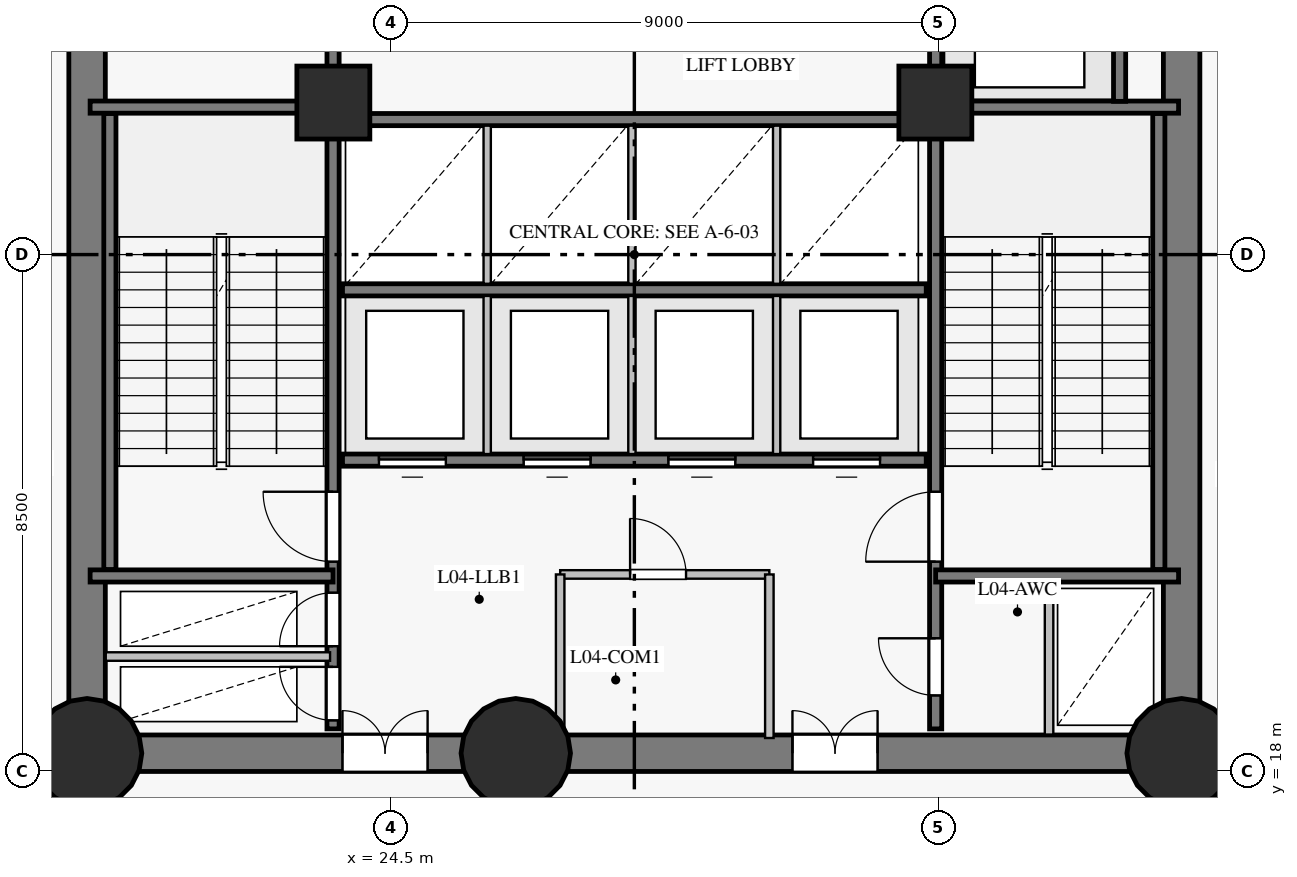
"""IFC4 building model, lengths in metres.
Left out: names, types, materials, properties, quantities, classifications, styles, units other than length and angle.
Written with IfcOpenShell. Run it as: python <this file> out.ifc"""

import sys

from ifc_helpers import new_model, si_unit, direction, frame, frame_2d, origin, origin_with_axes, origin_2d, place, context, subcontext, project, spatial, rectangle, circle, extrude, source, transform, mapped, element, fill, save


model = new_model("IFC4")
c1 = context("Model", 3, precision=1e-05, world=origin(), true_north=direction((0.0, 1.0)))
c2 = subcontext(c1, "Body", "Model", "MODEL_VIEW")
j1 = project(units=[si_unit("LENGTHUNIT", "METRE"), si_unit("PLANEANGLEUNIT", "RADIAN")], contexts=[c1])
p1 = place(None, origin())
s1 = spatial("IfcSite", under=j1, at=p1, CompositionType="ELEMENT")
p2 = place(p1, origin())
s2 = spatial("IfcBuilding", under=s1, at=p2, CompositionType="ELEMENT")
p3 = place(p2, frame((0.0, 0.0, 18.0)))
s3 = spatial("IfcBuildingStorey", under=s2, at=p3, CompositionType="ELEMENT", Elevation=18.0)
p4 = place(p3, frame((19.5, 18.3, 0.0), z_axis=(0.0, 0.0, 1.0), x_axis=(1.0, 0.0, 0.0)))
e1 = element("IfcWall", 1, at=p4, inside=s3, PredefinedType="SHEAR", context=c2, shape_type="SweptSolid", body=[
    extrude(rectangle(XDim=7.05, YDim=0.6, at=frame_2d((3.525, 0.0))), origin(), (0.0, 0.0, 1.0), 4.225),
])
p5 = place(p4, frame((4.2, 0.0, 0.0)))
e2 = element("IfcOpeningElement", 2, at=p5, cuts=e1, PredefinedType="OPENING", context=c2, shape_type="SweptSolid", body=[
    extrude(rectangle(XDim=1.4, YDim=2.2, at=frame_2d((0.7, 1.1))), frame((0.0, 0.31, 0.0), z_axis=(0.0, -1.0, 0.0), x_axis=(1.0, 0.0, 0.0)), (0.0, 0.0, 1.0), 0.62),
])
p6 = place(p3, frame((26.55, 18.3, 0.0), z_axis=(0.0, 0.0, 1.0), x_axis=(1.0, 0.0, 0.0)))
e3 = element("IfcWall", 3, at=p6, inside=s3, PredefinedType="SHEAR", context=c2, shape_type="SweptSolid", body=[
    extrude(rectangle(XDim=10.95, YDim=0.6, at=frame_2d((5.475, 0.0))), origin(), (0.0, 0.0, 1.0), 4.225),
])
p7 = place(p6, frame((4.55, 0.0, 0.0)))
e4 = element("IfcOpeningElement", 4, at=p7, cuts=e3, PredefinedType="OPENING", context=c2, shape_type="SweptSolid", body=[
    extrude(rectangle(XDim=1.4, YDim=2.2, at=frame_2d((0.7, 1.1))), frame((0.0, 0.31, 0.0), z_axis=(0.0, -1.0, 0.0), x_axis=(1.0, 0.0, 0.0)), (0.0, 0.0, 1.0), 0.62),
])
p8 = place(p3, frame((37.5, 18.3, 0.0), z_axis=(0.0, 0.0, 1.0), x_axis=(0.0, 1.0, 0.0)))
e5 = element("IfcWall", 5, at=p8, inside=s3, PredefinedType="SHEAR", context=c2, shape_type="SweptSolid", body=[
    extrude(rectangle(XDim=16.4, YDim=0.6, at=frame_2d((8.2, 0.0))), origin(), (0.0, 0.0, 1.0), 4.225),
])
p9 = place(p8, frame((13.96, 0.0, 0.0)))
e6 = element("IfcOpeningElement", 6, at=p9, cuts=e5, PredefinedType="OPENING", context=c2, shape_type="SweptSolid", body=[
    extrude(rectangle(XDim=1.2, YDim=2.15, at=frame_2d((0.6, 1.075))), frame((0.0, 0.31, 0.0), z_axis=(0.0, -1.0, 0.0), x_axis=(1.0, 0.0, 0.0)), (0.0, 0.0, 1.0), 0.62),
])
p10 = place(p3, frame((19.5, 34.7, 0.0), z_axis=(0.0, 0.0, 1.0), x_axis=(0.0, -1.0, 0.0)))
e7 = element("IfcWall", 7, at=p10, inside=s3, PredefinedType="SHEAR", context=c2, shape_type="SweptSolid", body=[
    extrude(rectangle(XDim=16.4, YDim=0.6, at=frame_2d((8.2, 0.0))), origin(), (0.0, 0.0, 1.0), 4.225),
])
p11 = place(p10, frame((3.1, 0.0, 0.0)))
e8 = element("IfcOpeningElement", 8, at=p11, cuts=e7, PredefinedType="OPENING", context=c2, shape_type="SweptSolid", body=[
    extrude(rectangle(XDim=1.1, YDim=2.15, at=frame_2d((0.55, 1.075))), frame((0.0, 0.31, 0.0), z_axis=(0.0, -1.0, 0.0), x_axis=(1.0, 0.0, 0.0)), (0.0, 0.0, 1.0), 0.62),
])
m1 = source(origin_with_axes(), c2, "Body", "SweptSolid", [
    extrude(circle(Radius=0.9, at=origin_2d()), origin(), (0.0, 0.0, 1.0), 4.5),
])
for number, where, z_axis, x_axis in (
    (9, (19.5, 18.3, 0.0), (0.0, 0.0, 1.0), (1.0, 0.0, 0.0)),
    (10, (26.55, 18.3, 0.0), (0.0, 0.0, 1.0), (1.0, 0.0, 0.0)),
    (11, (37.5, 18.3, 0.0), (0.0, 0.0, 1.0), (1.0, 0.0, 0.0)),
):
    element("IfcColumn", number, at=place(p3, frame(where, z_axis=z_axis, x_axis=x_axis)), inside=s3, PredefinedType="COLUMN", context=c2, shape_type="MappedRepresentation", body=[
        mapped(m1, transform((0.0, 0.0, 0.0), scale=1.0)),
    ])
m2 = source(origin_with_axes(), c2, "Body", "SweptSolid", [
    extrude(rectangle(XDim=1.2, YDim=1.2, at=origin_2d()), origin(), (0.0, 0.0, 1.0), 4.5),
])
for number, where, z_axis, x_axis in (
    (12, (23.55, 29.0, 0.0), (0.0, 0.0, 1.0), (1.0, 0.0, 0.0)),
    (13, (33.45, 29.0, 0.0), (0.0, 0.0, 1.0), (1.0, 0.0, 0.0)),
):
    element("IfcColumn", number, at=place(p3, frame(where, z_axis=z_axis, x_axis=x_axis)), inside=s3, PredefinedType="COLUMN", context=c2, shape_type="MappedRepresentation", body=[
        mapped(m2, transform((0.0, 0.0, 0.0), scale=1.0)),
    ])
p12 = place(p3, frame((23.545, 18.7, 0.0), z_axis=(0.0, 0.0, 1.0), x_axis=(0.0, 1.0, 0.0)))
e14 = element("IfcWall", 14, at=p12, inside=s3, PredefinedType="SHEAR", context=c2, shape_type="SweptSolid", body=[
    extrude(rectangle(XDim=15.6, YDim=0.2, at=frame_2d((7.8, 0.0))), origin(), (0.0, 0.0, 1.0), 4.225),
])
p13 = place(p12, frame((2.75, 0.0, 0.0)))
e15 = element("IfcOpeningElement", 15, at=p13, cuts=e14, PredefinedType="OPENING", context=c2, shape_type="SweptSolid", body=[
    extrude(rectangle(XDim=1.15, YDim=2.15, at=frame_2d((0.575, 1.075))), frame((0.0, 0.11, 0.0), z_axis=(0.0, -1.0, 0.0), x_axis=(1.0, 0.0, 0.0)), (0.0, 0.0, 1.0), 0.22),
])
p14 = place(p12, frame((0.14, 0.0, 0.0)))
e16 = element("IfcOpeningElement", 16, at=p14, cuts=e14, PredefinedType="OPENING", context=c2, shape_type="SweptSolid", body=[
    extrude(rectangle(XDim=0.88, YDim=2.1, at=frame_2d((0.44, 1.05))), frame((0.0, 0.11, 0.0), z_axis=(0.0, -1.0, 0.0), x_axis=(1.0, 0.0, 0.0)), (0.0, 0.0, 1.0), 0.22),
])
p15 = place(p12, frame((1.36, 0.0, 0.0)))
e17 = element("IfcOpeningElement", 17, at=p15, cuts=e14, PredefinedType="OPENING", context=c2, shape_type="SweptSolid", body=[
    extrude(rectangle(XDim=0.88, YDim=2.1, at=frame_2d((0.44, 1.05))), frame((0.0, 0.11, 0.0), z_axis=(0.0, -1.0, 0.0), x_axis=(1.0, 0.0, 0.0)), (0.0, 0.0, 1.0), 0.22),
])
p16 = place(p12, frame((12.1, 0.0, 0.0)))
e18 = element("IfcOpeningElement", 18, at=p16, cuts=e14, PredefinedType="OPENING", context=c2, shape_type="SweptSolid", body=[
    extrude(rectangle(XDim=1.12, YDim=2.15, at=frame_2d((0.56, 1.075))), frame((0.0, 0.11, 0.0), z_axis=(0.0, -1.0, 0.0), x_axis=(1.0, 0.0, 0.0)), (0.0, 0.0, 1.0), 0.22),
])
p17 = place(p12, frame((14.05, 0.0, 0.0)))
e19 = element("IfcOpeningElement", 19, at=p17, cuts=e14, PredefinedType="OPENING", context=c2, shape_type="SweptSolid", body=[
    extrude(rectangle(XDim=1.12, YDim=2.15, at=frame_2d((0.56, 1.075))), frame((0.0, 0.11, 0.0), z_axis=(0.0, -1.0, 0.0), x_axis=(1.0, 0.0, 0.0)), (0.0, 0.0, 1.0), 0.22),
])
p18 = place(p3, frame((33.455, 18.7, 0.0), z_axis=(0.0, 0.0, 1.0), x_axis=(0.0, 1.0, 0.0)))
e20 = element("IfcWall", 20, at=p18, inside=s3, PredefinedType="SHEAR", context=c2, shape_type="SweptSolid", body=[
    extrude(rectangle(XDim=15.6, YDim=0.2, at=frame_2d((7.8, 0.0))), origin(), (0.0, 0.0, 1.0), 4.225),
])
p19 = place(p18, frame((2.75, 0.0, 0.0)))
e21 = element("IfcOpeningElement", 21, at=p19, cuts=e20, PredefinedType="OPENING", context=c2, shape_type="SweptSolid", body=[
    extrude(rectangle(XDim=1.15, YDim=2.15, at=frame_2d((0.575, 1.075))), frame((0.0, 0.11, 0.0), z_axis=(0.0, -1.0, 0.0), x_axis=(1.0, 0.0, 0.0)), (0.0, 0.0, 1.0), 0.22),
])
p20 = place(p18, frame((0.55, 0.0, 0.0)))
e22 = element("IfcOpeningElement", 22, at=p20, cuts=e20, PredefinedType="OPENING", context=c2, shape_type="SweptSolid", body=[
    extrude(rectangle(XDim=0.94, YDim=2.1, at=frame_2d((0.47, 1.05))), frame((0.0, 0.11, 0.0), z_axis=(0.0, -1.0, 0.0), x_axis=(1.0, 0.0, 0.0)), (0.0, 0.0, 1.0), 0.22),
])
p21 = place(p3, frame((23.7, 23.12, 0.0), z_axis=(0.0, 0.0, 1.0), x_axis=(1.0, 0.0, 0.0)))
e23 = element("IfcWall", 23, at=p21, inside=s3, PredefinedType="SHEAR", context=c2, shape_type="SweptSolid", body=[
    extrude(rectangle(XDim=9.6, YDim=0.2, at=frame_2d((4.8, 0.0))), origin(), (0.0, 0.0, 1.0), 4.225),
])
p22 = place(p21, frame((0.6, 0.0, 0.0)))
e24 = element("IfcOpeningElement", 24, at=p22, cuts=e23, PredefinedType="OPENING", context=c2, shape_type="SweptSolid", body=[
    extrude(rectangle(XDim=1.1, YDim=2.15, at=frame_2d((0.55, 1.075))), frame((0.0, 0.11, 0.0), z_axis=(0.0, -1.0, 0.0), x_axis=(1.0, 0.0, 0.0)), (0.0, 0.0, 1.0), 0.22),
])
p23 = place(p21, frame((2.98, 0.0, 0.0)))
e25 = element("IfcOpeningElement", 25, at=p23, cuts=e23, PredefinedType="OPENING", context=c2, shape_type="SweptSolid", body=[
    extrude(rectangle(XDim=1.1, YDim=2.15, at=frame_2d((0.55, 1.075))), frame((0.0, 0.11, 0.0), z_axis=(0.0, -1.0, 0.0), x_axis=(1.0, 0.0, 0.0)), (0.0, 0.0, 1.0), 0.22),
])
p24 = place(p21, frame((5.36, 0.0, 0.0)))
e26 = element("IfcOpeningElement", 26, at=p24, cuts=e23, PredefinedType="OPENING", context=c2, shape_type="SweptSolid", body=[
    extrude(rectangle(XDim=1.1, YDim=2.15, at=frame_2d((0.55, 1.075))), frame((0.0, 0.11, 0.0), z_axis=(0.0, -1.0, 0.0), x_axis=(1.0, 0.0, 0.0)), (0.0, 0.0, 1.0), 0.22),
])
p25 = place(p21, frame((7.74, 0.0, 0.0)))
e27 = element("IfcOpeningElement", 27, at=p25, cuts=e23, PredefinedType="OPENING", context=c2, shape_type="SweptSolid", body=[
    extrude(rectangle(XDim=1.1, YDim=2.15, at=frame_2d((0.55, 1.075))), frame((0.0, 0.11, 0.0), z_axis=(0.0, -1.0, 0.0), x_axis=(1.0, 0.0, 0.0)), (0.0, 0.0, 1.0), 0.22),
])
for number, where, z_axis, x_axis in (
    (28, (23.7, 25.92, 0.0), (0.0, 0.0, 1.0), (1.0, 0.0, 0.0)),
    (29, (23.7, 28.72, 0.0), (0.0, 0.0, 1.0), (1.0, 0.0, 0.0)),
):
    element("IfcWall", number, at=place(p3, frame(where, z_axis=z_axis, x_axis=x_axis)), inside=s3, PredefinedType="SHEAR", context=c2, shape_type="SweptSolid", body=[
        extrude(rectangle(XDim=9.6, YDim=0.2, at=frame_2d((4.8, 0.0))), origin(), (0.0, 0.0, 1.0), 4.225),
    ])
for number, where, z_axis, x_axis in (
    (30, (19.875, 21.32, 0.0), (0.0, 0.0, 1.0), (0.0, 1.0, 0.0)),
    (31, (37.125, 21.32, 0.0), (0.0, 0.0, 1.0), (0.0, 1.0, 0.0)),
):
    element("IfcWall", number, at=place(p3, frame(where, z_axis=z_axis, x_axis=x_axis)), inside=s3, PredefinedType="SHEAR", context=c2, shape_type="SweptSolid", body=[
        extrude(rectangle(XDim=7.5, YDim=0.2, at=frame_2d((3.75, 0.0))), origin(), (0.0, 0.0, 1.0), 4.225),
    ])
for number, where, z_axis, x_axis in (
    (32, (33.455, 21.215, 0.0), (0.0, 0.0, 1.0), (1.0, 0.0, 0.0)),
    (33, (33.455, 28.925, 0.0), (0.0, 0.0, 1.0), (1.0, 0.0, 0.0)),
    (34, (19.55, 21.215, 0.0), (0.0, 0.0, 1.0), (1.0, 0.0, 0.0)),
    (35, (19.55, 28.925, 0.0), (0.0, 0.0, 1.0), (1.0, 0.0, 0.0)),
):
    element("IfcWall", number, at=place(p3, frame(where, z_axis=z_axis, x_axis=x_axis)), inside=s3, PredefinedType="SHEAR", context=c2, shape_type="SweptSolid", body=[
        extrude(rectangle(XDim=3.995, YDim=0.2, at=frame_2d((1.998, 0.0))), origin(), (0.0, 0.0, 1.0), 4.225),
    ])
p26 = place(p3, frame((36.48, 29.02, 0.0), z_axis=(0.0, 0.0, 1.0), x_axis=(0.0, 1.0, 0.0)))
e36 = element("IfcWall", 36, at=p26, inside=s3, PredefinedType="SHEAR", context=c2, shape_type="SweptSolid", body=[
    extrude(rectangle(XDim=2.86, YDim=0.2, at=frame_2d((1.43, 0.0))), origin(), (0.0, 0.0, 1.0), 4.225),
])
p27 = place(p3, frame((19.807, 19.89, 0.0), z_axis=(0.0, 0.0, 1.0), x_axis=(1.0, 0.0, 0.0)))
e37 = element("IfcWall", 37, at=p27, inside=s3, PredefinedType="PARTITIONING", context=c2, shape_type="SweptSolid", body=[
    extrude(rectangle(XDim=3.689, YDim=0.14, at=frame_2d((1.844, 0.0))), origin(), (0.0, 0.0, 1.0), 4.225),
])
p28 = place(p3, frame((27.28, 21.24, 0.0), z_axis=(0.0, 0.0, 1.0), x_axis=(1.0, 0.0, 0.0)))
e38 = element("IfcWall", 38, at=p28, inside=s3, PredefinedType="PARTITIONING", context=c2, shape_type="SweptSolid", body=[
    extrude(rectangle(XDim=3.44, YDim=0.14, at=frame_2d((1.72, 0.0))), origin(), (0.0, 0.0, 1.0), 4.225),
])
p29 = place(p28, frame((1.15, 0.0, 0.0)))
e39 = element("IfcOpeningElement", 39, at=p29, cuts=e38, PredefinedType="OPENING", context=c2, shape_type="SweptSolid", body=[
    extrude(rectangle(XDim=0.92, YDim=2.1, at=frame_2d((0.46, 1.05))), frame((0.0, 0.08, 0.0), z_axis=(0.0, -1.0, 0.0), x_axis=(1.0, 0.0, 0.0)), (0.0, 0.0, 1.0), 0.16),
])
for number, where, z_axis, x_axis in (
    (40, (27.28, 18.55, 0.0), (0.0, 0.0, 1.0), (0.0, 1.0, 0.0)),
    (41, (30.72, 18.55, 0.0), (0.0, 0.0, 1.0), (0.0, 1.0, 0.0)),
):
    element("IfcWall", number, at=place(p3, frame(where, z_axis=z_axis, x_axis=x_axis)), inside=s3, PredefinedType="PARTITIONING", context=c2, shape_type="SweptSolid", body=[
        extrude(rectangle(XDim=2.69, YDim=0.14, at=frame_2d((1.345, 0.0))), origin(), (0.0, 0.0, 1.0), 4.225),
    ])
for number, where, z_axis, x_axis in (
    (42, (26.08, 23.22, 0.0), (0.0, 0.0, 1.0), (0.0, 1.0, 0.0)),
    (43, (28.46, 23.22, 0.0), (0.0, 0.0, 1.0), (0.0, 1.0, 0.0)),
    (44, (30.84, 23.22, 0.0), (0.0, 0.0, 1.0), (0.0, 1.0, 0.0)),
    (45, (26.08, 26.02, 0.0), (0.0, 0.0, 1.0), (0.0, 1.0, 0.0)),
    (46, (28.46, 26.02, 0.0), (0.0, 0.0, 1.0), (0.0, 1.0, 0.0)),
    (47, (30.84, 26.02, 0.0), (0.0, 0.0, 1.0), (0.0, 1.0, 0.0)),
):
    element("IfcWall", number, at=place(p3, frame(where, z_axis=z_axis, x_axis=x_axis)), inside=s3, PredefinedType="PARTITIONING", context=c2, shape_type="SweptSolid", body=[
        extrude(rectangle(XDim=2.6, YDim=0.12, at=frame_2d((1.3, 0.0))), origin(), (0.0, 0.0, 1.0), 4.225),
    ])
p30 = place(p3, frame((35.32, 18.607, 0.0), z_axis=(0.0, 0.0, 1.0), x_axis=(0.0, 1.0, 0.0)))
e48 = element("IfcWall", 48, at=p30, inside=s3, PredefinedType="PARTITIONING", context=c2, shape_type="SweptSolid", body=[
    extrude(rectangle(XDim=2.503, YDim=0.14, at=frame_2d((1.251, 0.0))), origin(), (0.0, 0.0, 1.0), 4.225),
])
m3 = source(origin_with_axes(), c2, "Body", "SweptSolid", [
    extrude(rectangle(XDim=1.15, YDim=2.15, at=frame_2d((0.575, 1.075))), frame((0.0, 0.025, 0.0), z_axis=(0.0, -1.0, 0.0), x_axis=(1.0, 0.0, 0.0)), (0.0, 0.0, 1.0), 0.05),
])
p31 = place(p13, origin())
e49 = element("IfcDoor", 49, at=p31, inside=s3, OperationType="SINGLE_SWING_RIGHT", PredefinedType="DOOR", context=c2, shape_type="MappedRepresentation", body=[
    mapped(m3, transform((0.0, 0.0, 0.0), scale=1.0)),
])
fill(e15, e49)
p32 = place(p19, origin())
e50 = element("IfcDoor", 50, at=p32, inside=s3, OperationType="SINGLE_SWING_LEFT", PredefinedType="DOOR", context=c2, shape_type="MappedRepresentation", body=[
    mapped(m3, transform((0.0, 0.0, 0.0), scale=1.0)),
])
fill(e21, e50)
m4 = source(origin_with_axes(), c2, "Body", "SweptSolid", [
    extrude(rectangle(XDim=0.88, YDim=2.1, at=frame_2d((0.44, 1.05))), frame((0.0, 0.025, 0.0), z_axis=(0.0, -1.0, 0.0), x_axis=(1.0, 0.0, 0.0)), (0.0, 0.0, 1.0), 0.05),
])
p33 = place(p14, origin())
e51 = element("IfcDoor", 51, at=p33, inside=s3, OperationType="SINGLE_SWING_RIGHT", PredefinedType="DOOR", context=c2, shape_type="MappedRepresentation", body=[
    mapped(m4, transform((0.0, 0.0, 0.0), scale=1.0)),
])
fill(e16, e51)
p34 = place(p15, origin())
e52 = element("IfcDoor", 52, at=p34, inside=s3, OperationType="SINGLE_SWING_LEFT", PredefinedType="DOOR", context=c2, shape_type="MappedRepresentation", body=[
    mapped(m4, transform((0.0, 0.0, 0.0), scale=1.0)),
])
fill(e17, e52)
m5 = source(origin_with_axes(), c2, "Body", "SweptSolid", [
    extrude(rectangle(XDim=1.4, YDim=2.2, at=frame_2d((0.7, 1.1))), frame((0.0, 0.025, 0.0), z_axis=(0.0, -1.0, 0.0), x_axis=(1.0, 0.0, 0.0)), (0.0, 0.0, 1.0), 0.05),
])
p35 = place(p5, origin())
e53 = element("IfcDoor", 53, at=p35, inside=s3, OperationType="DOUBLE_DOOR_SINGLE_SWING", PredefinedType="DOOR", context=c2, shape_type="MappedRepresentation", body=[
    mapped(m5, transform((0.0, 0.0, 0.0), scale=1.0)),
])
fill(e2, e53)
p36 = place(p7, origin())
e54 = element("IfcDoor", 54, at=p36, inside=s3, OperationType="DOUBLE_DOOR_SINGLE_SWING", PredefinedType="DOOR", context=c2, shape_type="MappedRepresentation", body=[
    mapped(m5, transform((0.0, 0.0, 0.0), scale=1.0)),
])
fill(e4, e54)
m6 = source(origin_with_axes(), c2, "Body", "SweptSolid", [
    extrude(rectangle(XDim=0.94, YDim=2.1, at=frame_2d((0.47, 1.05))), frame((0.0, 0.025, 0.0), z_axis=(0.0, -1.0, 0.0), x_axis=(1.0, 0.0, 0.0)), (0.0, 0.0, 1.0), 0.05),
])
p37 = place(p20, origin())
e55 = element("IfcDoor", 55, at=p37, inside=s3, OperationType="SINGLE_SWING_RIGHT", PredefinedType="DOOR", context=c2, shape_type="MappedRepresentation", body=[
    mapped(m6, transform((0.0, 0.0, 0.0), scale=1.0)),
])
fill(e22, e55)
m7 = source(origin_with_axes(), c2, "Body", "SweptSolid", [
    extrude(rectangle(XDim=0.92, YDim=2.1, at=frame_2d((0.46, 1.05))), frame((0.0, 0.025, 0.0), z_axis=(0.0, -1.0, 0.0), x_axis=(1.0, 0.0, 0.0)), (0.0, 0.0, 1.0), 0.05),
])
p38 = place(p29, origin())
e56 = element("IfcDoor", 56, at=p38, inside=s3, OperationType="SINGLE_SWING_LEFT", PredefinedType="DOOR", context=c2, shape_type="MappedRepresentation", body=[
    mapped(m7, transform((0.0, 0.0, 0.0), scale=1.0)),
])
fill(e39, e56)
m8 = source(origin_with_axes(), c2, "Body", "SweptSolid", [
    extrude(rectangle(XDim=1.1, YDim=2.15, at=frame_2d((0.55, 1.075))), frame((0.0, 0.025, 0.0), z_axis=(0.0, -1.0, 0.0), x_axis=(1.0, 0.0, 0.0)), (0.0, 0.0, 1.0), 0.05),
])
p39 = place(p22, origin())
e57 = element("IfcDoor", 57, at=p39, inside=s3, OperationType="SLIDING_TO_LEFT", PredefinedType="DOOR", context=c2, shape_type="MappedRepresentation", body=[
    mapped(m8, transform((0.0, 0.0, 0.0), scale=1.0)),
])
fill(e24, e57)
p40 = place(p23, origin())
e58 = element("IfcDoor", 58, at=p40, inside=s3, OperationType="SLIDING_TO_RIGHT", PredefinedType="DOOR", context=c2, shape_type="MappedRepresentation", body=[
    mapped(m8, transform((0.0, 0.0, 0.0), scale=1.0)),
])
fill(e25, e58)
p41 = place(p24, origin())
e59 = element("IfcDoor", 59, at=p41, inside=s3, OperationType="SLIDING_TO_LEFT", PredefinedType="DOOR", context=c2, shape_type="MappedRepresentation", body=[
    mapped(m8, transform((0.0, 0.0, 0.0), scale=1.0)),
])
fill(e26, e59)
p42 = place(p25, origin())
e60 = element("IfcDoor", 60, at=p42, inside=s3, OperationType="SLIDING_TO_RIGHT", PredefinedType="DOOR", context=c2, shape_type="MappedRepresentation", body=[
    mapped(m8, transform((0.0, 0.0, 0.0), scale=1.0)),
])
fill(e27, e60)
save(model, sys.argv[1])
